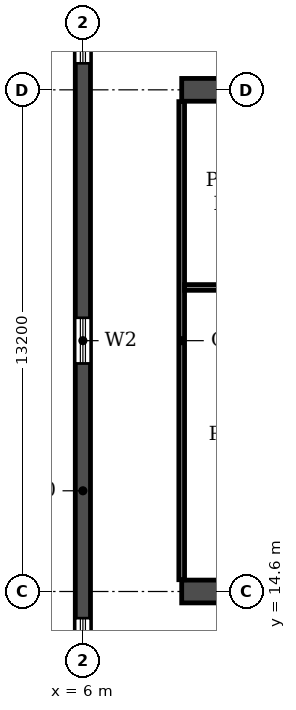
"""IFC4 building model, lengths in metres.
Left out: names, types, materials, properties, quantities, classifications, styles, units other than length and angle.
Written with IfcOpenShell. Run it as: python <this file> out.ifc"""

import sys

from ifc_helpers import new_model, si_unit, direction, frame, frame_2d, origin, place, context, subcontext, project, spatial, rectangle, extrude, element, fill, save


model = new_model("IFC4")
c1 = context("Model", 3, precision=1e-05, world=origin(), true_north=direction((0.0, 1.0)))
c2 = subcontext(c1, "Body", "Model", "MODEL_VIEW")
j1 = project(units=[si_unit("LENGTHUNIT", "METRE"), si_unit("PLANEANGLEUNIT", "RADIAN")], contexts=[c1])
p1 = place(None, origin())
s1 = spatial("IfcSite", under=j1, at=p1, CompositionType="ELEMENT")
p2 = place(p1, origin())
s2 = spatial("IfcBuilding", under=s1, at=p2, CompositionType="ELEMENT")
p3 = place(p2, frame((0.0, 0.0, 63.0)))
s3 = spatial("IfcBuildingStorey", under=s2, at=p3, CompositionType="ELEMENT", Elevation=63.0)
p4 = place(p3, frame((6.0, 4.683, 0.0), z_axis=(0.0, 0.0, 1.0), x_axis=(0.0, 1.0, 0.0)))
e1 = element("IfcWall", 1, at=p4, inside=s3, PredefinedType="SHEAR", context=c2, shape_type="SweptSolid", body=[
    extrude(rectangle(XDim=35.434, YDim=0.4, at=frame_2d((17.717, 0.0))), origin(), (0.0, 0.0, 1.0), 2.95),
])
p5 = place(p4, frame((23.817, 0.0, 0.9)))
e2 = element("IfcOpeningElement", 2, at=p5, cuts=e1, PredefinedType="OPENING", context=c2, shape_type="SweptSolid", body=[
    extrude(rectangle(XDim=1.2, YDim=1.5, at=frame_2d((0.6, 0.75))), frame((0.0, 0.21, 0.0), z_axis=(0.0, -1.0, 0.0), x_axis=(1.0, 0.0, 0.0)), (0.0, 0.0, 1.0), 0.42),
])
p6 = place(p4, frame((8.017, 0.0, 0.9)))
e3 = element("IfcOpeningElement", 3, at=p6, cuts=e1, PredefinedType="OPENING", context=c2, shape_type="SweptSolid", body=[
    extrude(rectangle(XDim=1.2, YDim=1.5, at=frame_2d((0.6, 0.75))), frame((0.0, 0.21, 0.0), z_axis=(0.0, -1.0, 0.0), x_axis=(1.0, 0.0, 0.0)), (0.0, 0.0, 1.0), 0.42),
])
p7 = place(p4, frame((15.917, 0.0, 0.9)))
e4 = element("IfcOpeningElement", 4, at=p7, cuts=e1, PredefinedType="OPENING", context=c2, shape_type="SweptSolid", body=[
    extrude(rectangle(XDim=1.2, YDim=1.5, at=frame_2d((0.6, 0.75))), frame((0.0, 0.21, 0.0), z_axis=(0.0, -1.0, 0.0), x_axis=(1.0, 0.0, 0.0)), (0.0, 0.0, 1.0), 0.42),
])
p8 = place(p4, frame((29.493, 0.0, 0.6)))
e5 = element("IfcOpeningElement", 5, at=p8, cuts=e1, PredefinedType="OPENING", context=c2, shape_type="SweptSolid", body=[
    extrude(rectangle(XDim=2.2, YDim=1.8, at=frame_2d((1.1, 0.9))), frame((0.0, 0.21, 0.0), z_axis=(0.0, -1.0, 0.0), x_axis=(1.0, 0.0, 0.0)), (0.0, 0.0, 1.0), 0.42),
])
p9 = place(p4, frame((2.541, 0.0, 0.6)))
e6 = element("IfcOpeningElement", 6, at=p9, cuts=e1, PredefinedType="OPENING", context=c2, shape_type="SweptSolid", body=[
    extrude(rectangle(XDim=2.2, YDim=1.8, at=frame_2d((1.1, 0.9))), frame((0.0, 0.21, 0.0), z_axis=(0.0, -1.0, 0.0), x_axis=(1.0, 0.0, 0.0)), (0.0, 0.0, 1.0), 0.42),
])
p10 = place(p3, frame((8.6, 14.6, 0.0), z_axis=(0.0, 0.0, 1.0), x_axis=(1.0, 0.0, 0.0)))
e7 = element("IfcWall", 7, at=p10, inside=s3, PredefinedType="SOLIDWALL", context=c2, shape_type="SweptSolid", body=[
    extrude(rectangle(XDim=84.8, YDim=0.6, at=frame_2d((42.4, 0.0))), origin(), (0.0, 0.0, 1.0), 2.95),
])
p11 = place(p10, frame((1.35, 0.0, 0.0)))
e8 = element("IfcOpeningElement", 8, at=p11, cuts=e7, PredefinedType="OPENING", context=c2, shape_type="SweptSolid", body=[
    extrude(rectangle(XDim=1.0, YDim=2.1, at=frame_2d((0.5, 1.05))), frame((0.0, 0.31, 0.0), z_axis=(0.0, -1.0, 0.0), x_axis=(1.0, 0.0, 0.0)), (0.0, 0.0, 1.0), 0.62),
])
p12 = place(p10, frame((6.05, 0.0, 0.0)))
e9 = element("IfcOpeningElement", 9, at=p12, cuts=e7, PredefinedType="OPENING", context=c2, shape_type="SweptSolid", body=[
    extrude(rectangle(XDim=1.0, YDim=2.1, at=frame_2d((0.5, 1.05))), frame((0.0, 0.31, 0.0), z_axis=(0.0, -1.0, 0.0), x_axis=(1.0, 0.0, 0.0)), (0.0, 0.0, 1.0), 0.62),
])
p13 = place(p10, frame((10.3, 0.0, 0.0)))
e10 = element("IfcOpeningElement", 10, at=p13, cuts=e7, PredefinedType="OPENING", context=c2, shape_type="SweptSolid", body=[
    extrude(rectangle(XDim=1.0, YDim=2.1, at=frame_2d((0.5, 1.05))), frame((0.0, 0.31, 0.0), z_axis=(0.0, -1.0, 0.0), x_axis=(1.0, 0.0, 0.0)), (0.0, 0.0, 1.0), 0.62),
])
p14 = place(p10, frame((18.2, 0.0, 0.0)))
e11 = element("IfcOpeningElement", 11, at=p14, cuts=e7, PredefinedType="OPENING", context=c2, shape_type="SweptSolid", body=[
    extrude(rectangle(XDim=1.0, YDim=2.1, at=frame_2d((0.5, 1.05))), frame((0.0, 0.31, 0.0), z_axis=(0.0, -1.0, 0.0), x_axis=(1.0, 0.0, 0.0)), (0.0, 0.0, 1.0), 0.62),
])
p15 = place(p10, frame((22.8, 0.0, 0.0)))
e12 = element("IfcOpeningElement", 12, at=p15, cuts=e7, PredefinedType="OPENING", context=c2, shape_type="SweptSolid", body=[
    extrude(rectangle(XDim=1.0, YDim=2.1, at=frame_2d((0.5, 1.05))), frame((0.0, 0.31, 0.0), z_axis=(0.0, -1.0, 0.0), x_axis=(1.0, 0.0, 0.0)), (0.0, 0.0, 1.0), 0.62),
])
p16 = place(p10, frame((35.4, 0.0, 0.0)))
e13 = element("IfcOpeningElement", 13, at=p16, cuts=e7, PredefinedType="OPENING", context=c2, shape_type="SweptSolid", body=[
    extrude(rectangle(XDim=1.0, YDim=2.1, at=frame_2d((0.5, 1.05))), frame((0.0, 0.31, 0.0), z_axis=(0.0, -1.0, 0.0), x_axis=(1.0, 0.0, 0.0)), (0.0, 0.0, 1.0), 0.62),
])
p17 = place(p10, frame((39.3, 0.0, 0.0)))
e14 = element("IfcOpeningElement", 14, at=p17, cuts=e7, PredefinedType="OPENING", context=c2, shape_type="SweptSolid", body=[
    extrude(rectangle(XDim=1.0, YDim=2.1, at=frame_2d((0.5, 1.05))), frame((0.0, 0.31, 0.0), z_axis=(0.0, -1.0, 0.0), x_axis=(1.0, 0.0, 0.0)), (0.0, 0.0, 1.0), 0.62),
])
p18 = place(p10, frame((41.9, 0.0, 0.0)))
e15 = element("IfcOpeningElement", 15, at=p18, cuts=e7, PredefinedType="OPENING", context=c2, shape_type="SweptSolid", body=[
    extrude(rectangle(XDim=1.0, YDim=2.1, at=frame_2d((0.5, 1.05))), frame((0.0, 0.31, 0.0), z_axis=(0.0, -1.0, 0.0), x_axis=(1.0, 0.0, 0.0)), (0.0, 0.0, 1.0), 0.62),
])
p19 = place(p10, frame((47.1, 0.0, 0.0)))
e16 = element("IfcOpeningElement", 16, at=p19, cuts=e7, PredefinedType="OPENING", context=c2, shape_type="SweptSolid", body=[
    extrude(rectangle(XDim=1.0, YDim=2.1, at=frame_2d((0.5, 1.05))), frame((0.0, 0.31, 0.0), z_axis=(0.0, -1.0, 0.0), x_axis=(1.0, 0.0, 0.0)), (0.0, 0.0, 1.0), 0.62),
])
p20 = place(p10, frame((61.0, 0.0, 0.0)))
e17 = element("IfcOpeningElement", 17, at=p20, cuts=e7, PredefinedType="OPENING", context=c2, shape_type="SweptSolid", body=[
    extrude(rectangle(XDim=1.0, YDim=2.1, at=frame_2d((0.5, 1.05))), frame((0.0, 0.31, 0.0), z_axis=(0.0, -1.0, 0.0), x_axis=(1.0, 0.0, 0.0)), (0.0, 0.0, 1.0), 0.62),
])
p21 = place(p10, frame((65.6, 0.0, 0.0)))
e18 = element("IfcOpeningElement", 18, at=p21, cuts=e7, PredefinedType="OPENING", context=c2, shape_type="SweptSolid", body=[
    extrude(rectangle(XDim=1.0, YDim=2.1, at=frame_2d((0.5, 1.05))), frame((0.0, 0.31, 0.0), z_axis=(0.0, -1.0, 0.0), x_axis=(1.0, 0.0, 0.0)), (0.0, 0.0, 1.0), 0.62),
])
p22 = place(p10, frame((73.5, 0.0, 0.0)))
e19 = element("IfcOpeningElement", 19, at=p22, cuts=e7, PredefinedType="OPENING", context=c2, shape_type="SweptSolid", body=[
    extrude(rectangle(XDim=1.0, YDim=2.1, at=frame_2d((0.5, 1.05))), frame((0.0, 0.31, 0.0), z_axis=(0.0, -1.0, 0.0), x_axis=(1.0, 0.0, 0.0)), (0.0, 0.0, 1.0), 0.62),
])
p23 = place(p10, frame((77.9, 0.0, 0.0)))
e20 = element("IfcOpeningElement", 20, at=p23, cuts=e7, PredefinedType="OPENING", context=c2, shape_type="SweptSolid", body=[
    extrude(rectangle(XDim=1.0, YDim=2.1, at=frame_2d((0.5, 1.05))), frame((0.0, 0.31, 0.0), z_axis=(0.0, -1.0, 0.0), x_axis=(1.0, 0.0, 0.0)), (0.0, 0.0, 1.0), 0.62),
])
p24 = place(p10, frame((82.6, 0.0, 0.0)))
e21 = element("IfcOpeningElement", 21, at=p24, cuts=e7, PredefinedType="OPENING", context=c2, shape_type="SweptSolid", body=[
    extrude(rectangle(XDim=1.0, YDim=2.1, at=frame_2d((0.5, 1.05))), frame((0.0, 0.31, 0.0), z_axis=(0.0, -1.0, 0.0), x_axis=(1.0, 0.0, 0.0)), (0.0, 0.0, 1.0), 0.62),
])
p25 = place(p3, frame((8.6, 27.8, 0.0), z_axis=(0.0, 0.0, 1.0), x_axis=(1.0, 0.0, 0.0)))
e22 = element("IfcWall", 22, at=p25, inside=s3, PredefinedType="SOLIDWALL", context=c2, shape_type="SweptSolid", body=[
    extrude(rectangle(XDim=84.8, YDim=0.6, at=frame_2d((42.4, 0.0))), origin(), (0.0, 0.0, 1.0), 2.95),
])
p26 = place(p25, frame((1.2, 0.0, 0.0)))
e23 = element("IfcOpeningElement", 23, at=p26, cuts=e22, PredefinedType="OPENING", context=c2, shape_type="SweptSolid", body=[
    extrude(rectangle(XDim=1.0, YDim=2.1, at=frame_2d((0.5, 1.05))), frame((0.0, 0.31, 0.0), z_axis=(0.0, -1.0, 0.0), x_axis=(1.0, 0.0, 0.0)), (0.0, 0.0, 1.0), 0.62),
])
p27 = place(p25, frame((5.9, 0.0, 0.0)))
e24 = element("IfcOpeningElement", 24, at=p27, cuts=e22, PredefinedType="OPENING", context=c2, shape_type="SweptSolid", body=[
    extrude(rectangle(XDim=1.0, YDim=2.1, at=frame_2d((0.5, 1.05))), frame((0.0, 0.31, 0.0), z_axis=(0.0, -1.0, 0.0), x_axis=(1.0, 0.0, 0.0)), (0.0, 0.0, 1.0), 0.62),
])
p28 = place(p25, frame((10.3, 0.0, 0.0)))
e25 = element("IfcOpeningElement", 25, at=p28, cuts=e22, PredefinedType="OPENING", context=c2, shape_type="SweptSolid", body=[
    extrude(rectangle(XDim=1.0, YDim=2.1, at=frame_2d((0.5, 1.05))), frame((0.0, 0.31, 0.0), z_axis=(0.0, -1.0, 0.0), x_axis=(1.0, 0.0, 0.0)), (0.0, 0.0, 1.0), 0.62),
])
p29 = place(p25, frame((13.65, 0.0, 0.0)))
e26 = element("IfcOpeningElement", 26, at=p29, cuts=e22, PredefinedType="OPENING", context=c2, shape_type="SweptSolid", body=[
    extrude(rectangle(XDim=0.9, YDim=2.1, at=frame_2d((0.45, 1.05))), frame((0.0, 0.31, 0.0), z_axis=(0.0, -1.0, 0.0), x_axis=(1.0, 0.0, 0.0)), (0.0, 0.0, 1.0), 0.62),
])
p30 = place(p25, frame((22.85, 0.0, 0.0)))
e27 = element("IfcOpeningElement", 27, at=p30, cuts=e22, PredefinedType="OPENING", context=c2, shape_type="SweptSolid", body=[
    extrude(rectangle(XDim=0.9, YDim=2.1, at=frame_2d((0.45, 1.05))), frame((0.0, 0.31, 0.0), z_axis=(0.0, -1.0, 0.0), x_axis=(1.0, 0.0, 0.0)), (0.0, 0.0, 1.0), 0.62),
])
p31 = place(p25, frame((27.3, 0.0, 0.0)))
e28 = element("IfcOpeningElement", 28, at=p31, cuts=e22, PredefinedType="OPENING", context=c2, shape_type="SweptSolid", body=[
    extrude(rectangle(XDim=1.0, YDim=2.1, at=frame_2d((0.5, 1.05))), frame((0.0, 0.31, 0.0), z_axis=(0.0, -1.0, 0.0), x_axis=(1.0, 0.0, 0.0)), (0.0, 0.0, 1.0), 0.62),
])
p32 = place(p25, frame((32.5, 0.0, 0.0)))
e29 = element("IfcOpeningElement", 29, at=p32, cuts=e22, PredefinedType="OPENING", context=c2, shape_type="SweptSolid", body=[
    extrude(rectangle(XDim=1.0, YDim=2.1, at=frame_2d((0.5, 1.05))), frame((0.0, 0.31, 0.0), z_axis=(0.0, -1.0, 0.0), x_axis=(1.0, 0.0, 0.0)), (0.0, 0.0, 1.0), 0.62),
])
p33 = place(p25, frame((39.0, 0.0, 0.0)))
e30 = element("IfcOpeningElement", 30, at=p33, cuts=e22, PredefinedType="OPENING", context=c2, shape_type="SweptSolid", body=[
    extrude(rectangle(XDim=1.0, YDim=2.1, at=frame_2d((0.5, 1.05))), frame((0.0, 0.31, 0.0), z_axis=(0.0, -1.0, 0.0), x_axis=(1.0, 0.0, 0.0)), (0.0, 0.0, 1.0), 0.62),
])
p34 = place(p25, frame((41.9, 0.0, 0.0)))
e31 = element("IfcOpeningElement", 31, at=p34, cuts=e22, PredefinedType="OPENING", context=c2, shape_type="SweptSolid", body=[
    extrude(rectangle(XDim=1.0, YDim=2.1, at=frame_2d((0.5, 1.05))), frame((0.0, 0.31, 0.0), z_axis=(0.0, -1.0, 0.0), x_axis=(1.0, 0.0, 0.0)), (0.0, 0.0, 1.0), 0.62),
])
p35 = place(p25, frame((47.4, 0.0, 0.0)))
e32 = element("IfcOpeningElement", 32, at=p35, cuts=e22, PredefinedType="OPENING", context=c2, shape_type="SweptSolid", body=[
    extrude(rectangle(XDim=1.0, YDim=2.1, at=frame_2d((0.5, 1.05))), frame((0.0, 0.31, 0.0), z_axis=(0.0, -1.0, 0.0), x_axis=(1.0, 0.0, 0.0)), (0.0, 0.0, 1.0), 0.62),
])
p36 = place(p25, frame((53.9, 0.0, 0.0)))
e33 = element("IfcOpeningElement", 33, at=p36, cuts=e22, PredefinedType="OPENING", context=c2, shape_type="SweptSolid", body=[
    extrude(rectangle(XDim=1.0, YDim=2.1, at=frame_2d((0.5, 1.05))), frame((0.0, 0.31, 0.0), z_axis=(0.0, -1.0, 0.0), x_axis=(1.0, 0.0, 0.0)), (0.0, 0.0, 1.0), 0.62),
])
p37 = place(p25, frame((57.8, 0.0, 0.0)))
e34 = element("IfcOpeningElement", 34, at=p37, cuts=e22, PredefinedType="OPENING", context=c2, shape_type="SweptSolid", body=[
    extrude(rectangle(XDim=1.0, YDim=2.1, at=frame_2d((0.5, 1.05))), frame((0.0, 0.31, 0.0), z_axis=(0.0, -1.0, 0.0), x_axis=(1.0, 0.0, 0.0)), (0.0, 0.0, 1.0), 0.62),
])
p38 = place(p25, frame((61.05, 0.0, 0.0)))
e35 = element("IfcOpeningElement", 35, at=p38, cuts=e22, PredefinedType="OPENING", context=c2, shape_type="SweptSolid", body=[
    extrude(rectangle(XDim=0.9, YDim=2.1, at=frame_2d((0.45, 1.05))), frame((0.0, 0.31, 0.0), z_axis=(0.0, -1.0, 0.0), x_axis=(1.0, 0.0, 0.0)), (0.0, 0.0, 1.0), 0.62),
])
p39 = place(p25, frame((70.25, 0.0, 0.0)))
e36 = element("IfcOpeningElement", 36, at=p39, cuts=e22, PredefinedType="OPENING", context=c2, shape_type="SweptSolid", body=[
    extrude(rectangle(XDim=0.9, YDim=2.1, at=frame_2d((0.45, 1.05))), frame((0.0, 0.31, 0.0), z_axis=(0.0, -1.0, 0.0), x_axis=(1.0, 0.0, 0.0)), (0.0, 0.0, 1.0), 0.62),
])
p40 = place(p25, frame((73.5, 0.0, 0.0)))
e37 = element("IfcOpeningElement", 37, at=p40, cuts=e22, PredefinedType="OPENING", context=c2, shape_type="SweptSolid", body=[
    extrude(rectangle(XDim=1.0, YDim=2.1, at=frame_2d((0.5, 1.05))), frame((0.0, 0.31, 0.0), z_axis=(0.0, -1.0, 0.0), x_axis=(1.0, 0.0, 0.0)), (0.0, 0.0, 1.0), 0.62),
])
p41 = place(p25, frame((77.75, 0.0, 0.0)))
e38 = element("IfcOpeningElement", 38, at=p41, cuts=e22, PredefinedType="OPENING", context=c2, shape_type="SweptSolid", body=[
    extrude(rectangle(XDim=1.0, YDim=2.1, at=frame_2d((0.5, 1.05))), frame((0.0, 0.31, 0.0), z_axis=(0.0, -1.0, 0.0), x_axis=(1.0, 0.0, 0.0)), (0.0, 0.0, 1.0), 0.62),
])
p42 = place(p25, frame((82.45, 0.0, 0.0)))
e39 = element("IfcOpeningElement", 39, at=p42, cuts=e22, PredefinedType="OPENING", context=c2, shape_type="SweptSolid", body=[
    extrude(rectangle(XDim=1.0, YDim=2.1, at=frame_2d((0.5, 1.05))), frame((0.0, 0.31, 0.0), z_axis=(0.0, -1.0, 0.0), x_axis=(1.0, 0.0, 0.0)), (0.0, 0.0, 1.0), 0.62),
])
p43 = place(p3, frame((8.6, 14.91, 0.0), z_axis=(0.0, 0.0, 1.0), x_axis=(0.0, 1.0, 0.0)))
e40 = element("IfcWall", 40, at=p43, inside=s3, PredefinedType="PARTITIONING", context=c2, shape_type="SweptSolid", body=[
    extrude(rectangle(XDim=12.58, YDim=0.15, at=frame_2d((6.29, 0.0))), origin(), (0.0, 0.0, 1.0), 2.95),
])
p44 = place(p3, frame((8.675, 22.6, 0.0), z_axis=(0.0, 0.0, 1.0), x_axis=(1.0, 0.0, 0.0)))
e41 = element("IfcWall", 41, at=p44, inside=s3, PredefinedType="PARTITIONING", context=c2, shape_type="SweptSolid", body=[
    extrude(rectangle(XDim=9.25, YDim=0.15, at=frame_2d((4.625, 0.0))), origin(), (0.0, 0.0, 1.0), 2.95),
])
p45 = place(p5, origin())
e42 = element("IfcWindow", 42, at=p45, inside=s3, PartitioningType="SINGLE_PANEL", PredefinedType="WINDOW", context=c2, shape_type="SweptSolid", body=[
    extrude(rectangle(XDim=1.2, YDim=1.5, at=frame_2d((0.6, 0.75))), frame((0.0, 0.03, 0.0), z_axis=(0.0, -1.0, 0.0), x_axis=(1.0, 0.0, 0.0)), (0.0, 0.0, 1.0), 0.06),
])
fill(e2, e42)
p46 = place(p6, origin())
e43 = element("IfcWindow", 43, at=p46, inside=s3, PartitioningType="SINGLE_PANEL", PredefinedType="WINDOW", context=c2, shape_type="SweptSolid", body=[
    extrude(rectangle(XDim=1.2, YDim=1.5, at=frame_2d((0.6, 0.75))), frame((0.0, 0.03, 0.0), z_axis=(0.0, -1.0, 0.0), x_axis=(1.0, 0.0, 0.0)), (0.0, 0.0, 1.0), 0.06),
])
fill(e3, e43)
p47 = place(p7, origin())
e44 = element("IfcWindow", 44, at=p47, inside=s3, PartitioningType="SINGLE_PANEL", PredefinedType="WINDOW", context=c2, shape_type="SweptSolid", body=[
    extrude(rectangle(XDim=1.2, YDim=1.5, at=frame_2d((0.6, 0.75))), frame((0.0, 0.03, 0.0), z_axis=(0.0, -1.0, 0.0), x_axis=(1.0, 0.0, 0.0)), (0.0, 0.0, 1.0), 0.06),
])
fill(e4, e44)
save(model, sys.argv[1])
